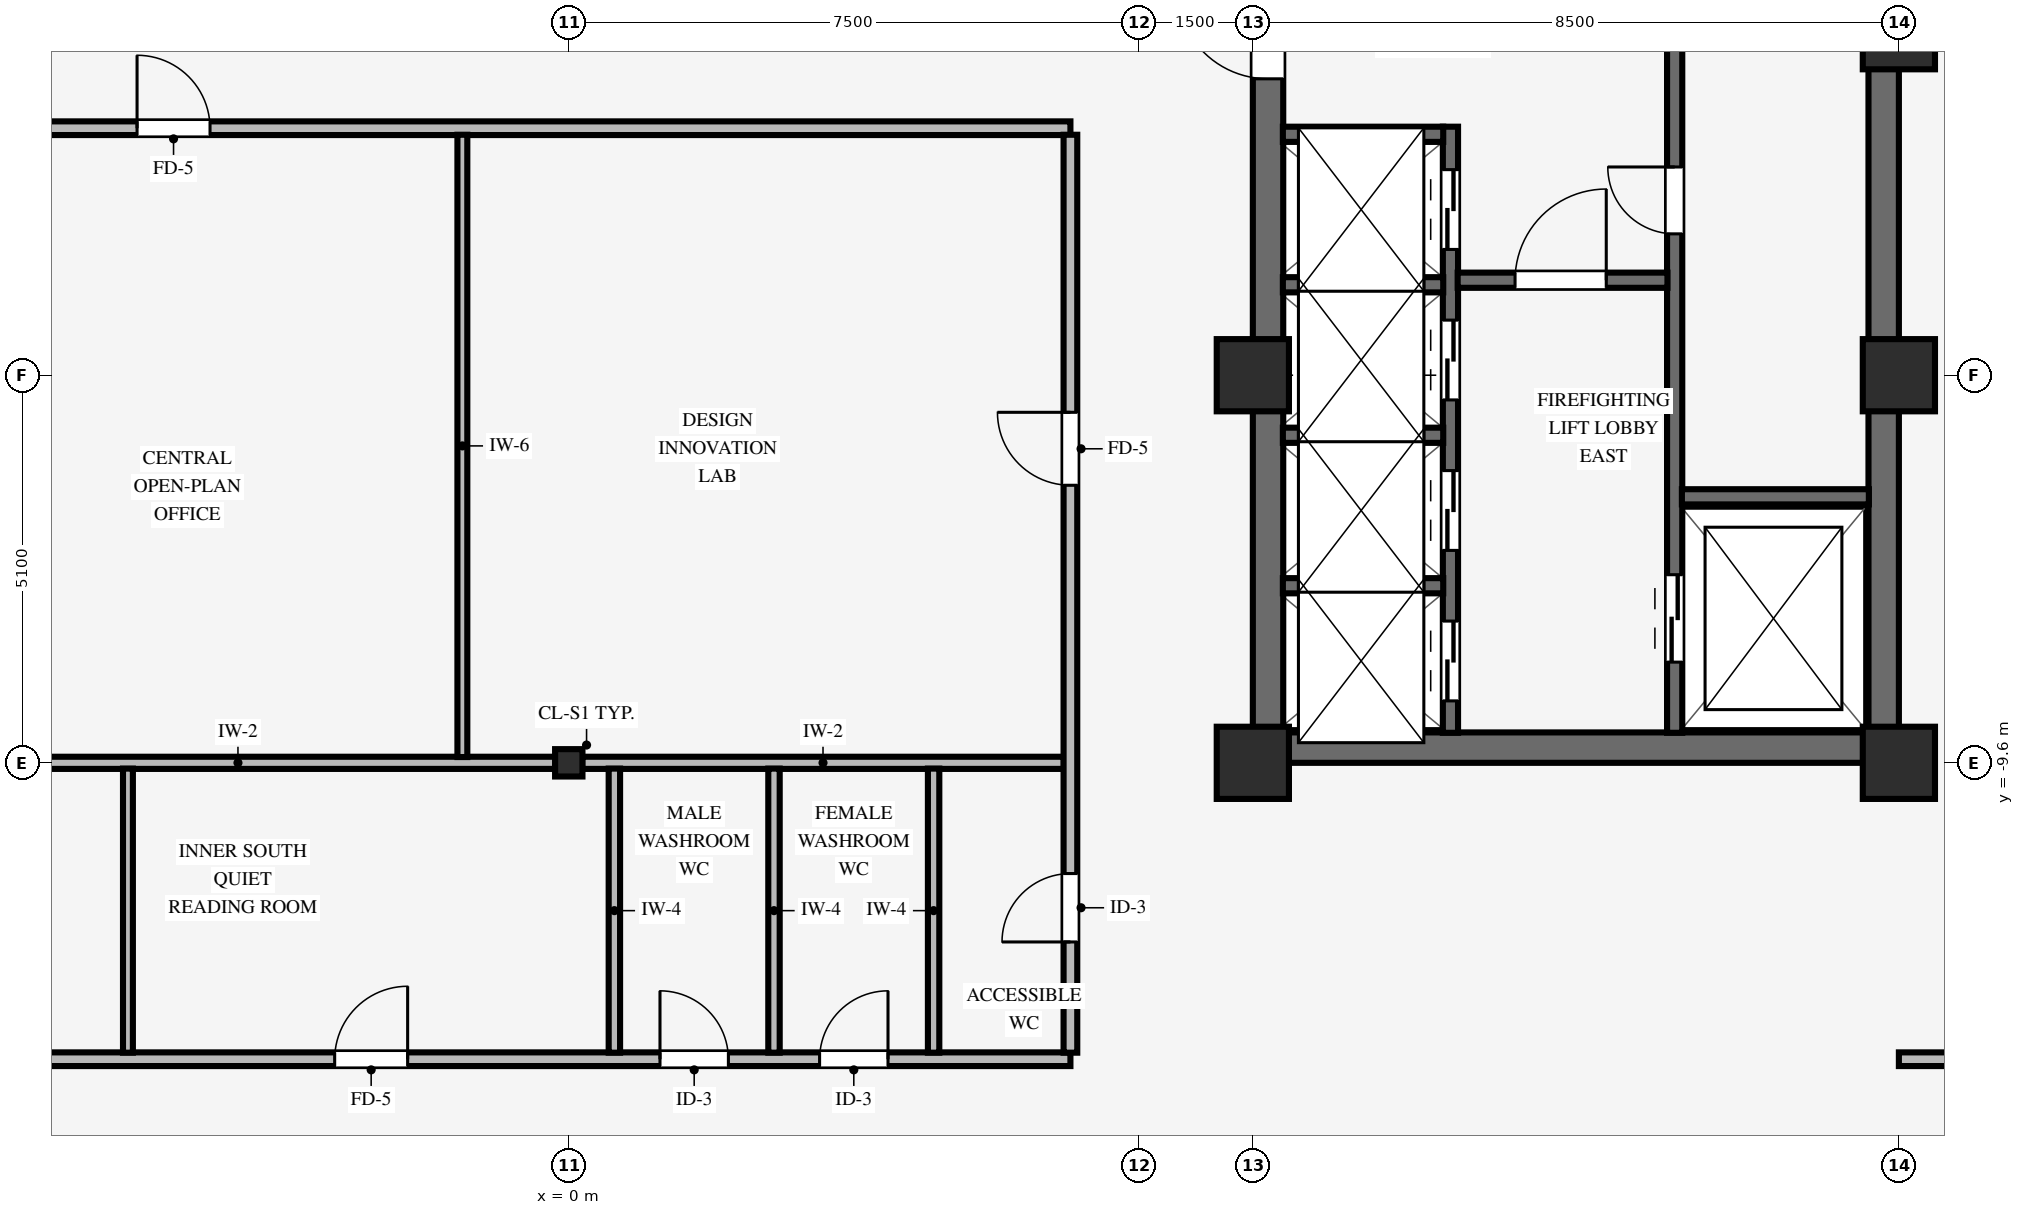
"""IFC4 building model, lengths in metres.
Left out: names, types, materials, properties, quantities, classifications, styles, units other than length and angle.
Written with IfcOpenShell. Run it as: python <this file> out.ifc"""

import sys

from ifc_helpers import new_model, si_unit, direction, frame, frame_2d, origin, origin_2d, place, context, subcontext, project, spatial, rectangle, i_section, extrude, source, transform, mapped, element, fill, save


model = new_model("IFC4")
c1 = context("Model", 3, precision=1e-05, world=origin(), true_north=direction((0.0, 1.0)))
c2 = subcontext(c1, "Body", "Model", "MODEL_VIEW")
j1 = project(units=[si_unit("LENGTHUNIT", "METRE"), si_unit("PLANEANGLEUNIT", "RADIAN")], contexts=[c1])
p1 = place(None, origin())
s1 = spatial("IfcSite", under=j1, at=p1, CompositionType="ELEMENT")
p2 = place(p1, origin())
s2 = spatial("IfcBuilding", under=s1, at=p2, CompositionType="ELEMENT")
p3 = place(p2, frame((0.0, 0.0, 156.7)))
s3 = spatial("IfcBuildingStorey", under=s2, at=p3, CompositionType="ELEMENT", Elevation=156.7)
p4 = place(p3, frame((9.0, -9.4, 0.0), z_axis=(0.0, 0.0, 1.0), x_axis=(1.0, 0.0, 0.0)))
e1 = element("IfcWall", 1, at=p4, inside=s3, PredefinedType="SHEAR", context=c2, shape_type="SweptSolid", body=[
    extrude(rectangle(XDim=8.5, YDim=0.4, at=frame_2d((4.25, 0.0))), origin(), (0.0, 0.0, 1.0), 3.37),
])
p5 = place(p3, frame((9.2, -9.205, 0.0), z_axis=(0.0, 0.0, 1.0), x_axis=(0.0, 1.0, 0.0)))
e2 = element("IfcWall", 2, at=p5, inside=s3, PredefinedType="SHEAR", context=c2, shape_type="SweptSolid", body=[
    extrude(rectangle(XDim=18.41, YDim=0.4, at=frame_2d((9.205, 0.0))), origin(), (0.0, 0.0, 1.0), 3.37),
])
p6 = place(p5, frame((8.605, 0.0, 0.0)))
e3 = element("IfcOpeningElement", 3, at=p6, cuts=e2, PredefinedType="OPENING", context=c2, shape_type="SweptSolid", body=[
    extrude(rectangle(XDim=1.2, YDim=2.15, at=frame_2d((0.6, 1.075))), frame((0.0, 0.21, 0.0), z_axis=(0.0, -1.0, 0.0), x_axis=(1.0, 0.0, 0.0)), (0.0, 0.0, 1.0), 0.42),
])
p7 = place(p3, frame((17.3, -9.205, 0.0), z_axis=(0.0, 0.0, 1.0), x_axis=(0.0, 1.0, 0.0)))
e4 = element("IfcWall", 4, at=p7, inside=s3, PredefinedType="SHEAR", context=c2, shape_type="SweptSolid", body=[
    extrude(rectangle(XDim=18.41, YDim=0.4, at=frame_2d((9.205, 0.0))), origin(), (0.0, 0.0, 1.0), 3.37),
])
for number, where, z_axis, x_axis in (
    (5, (9.0, -9.6, 0.0), (0.0, 0.0, 1.0), (1.0, 0.0, 0.0)),
    (6, (9.0, -4.5, 0.0), (0.0, 0.0, 1.0), (1.0, 0.0, 0.0)),
    (7, (17.5, -9.6, 0.0), (0.0, 0.0, 1.0), (1.0, 0.0, 0.0)),
    (8, (17.5, -4.5, 0.0), (0.0, 0.0, 1.0), (1.0, 0.0, 0.0)),
    (9, (17.5, 0.0, 0.0), (0.0, 0.0, 1.0), (1.0, 0.0, 0.0)),
):
    element("IfcColumn", number, at=place(p3, frame(where, z_axis=z_axis, x_axis=x_axis)), inside=s3, PredefinedType="COLUMN", context=c2, shape_type="SweptSolid", body=[
        extrude(rectangle(XDim=0.95, YDim=0.95, at=origin_2d()), origin(), (0.0, 0.0, 1.0), 3.37),
    ])
p8 = place(p3, frame((0.0, -9.6, 0.0), z_axis=(0.0, 0.0, 1.0), x_axis=(1.0, 0.0, 0.0)))
e10 = element("IfcColumn", 10, at=p8, inside=s3, PredefinedType="COLUMN", context=c2, shape_type="SweptSolid", body=[
    extrude(i_section(OverallWidth=0.36, OverallDepth=0.36, WebThickness=0.021, FlangeThickness=0.021, FilletRadius=0.018, at=origin_2d()), origin(), (0.0, 0.0, 1.0), 3.37),
])
p9 = place(p3, frame((14.55, -9.205, 0.0), z_axis=(0.0, 0.0, 1.0), x_axis=(0.0, 1.0, 0.0)))
e11 = element("IfcWall", 11, at=p9, inside=s3, PredefinedType="SHEAR", context=c2, shape_type="SweptSolid", body=[
    extrude(rectangle(XDim=10.11, YDim=0.2, at=frame_2d((5.055, 0.0))), origin(), (0.0, 0.0, 1.0), 3.37),
])
p10 = place(p9, frame((6.565, 0.0, 0.0)))
e12 = element("IfcOpeningElement", 12, at=p10, cuts=e11, PredefinedType="OPENING", context=c2, shape_type="SweptSolid", body=[
    extrude(rectangle(XDim=0.88, YDim=2.1, at=frame_2d((0.44, 1.05))), frame((0.0, 0.11, 0.0), z_axis=(0.0, -1.0, 0.0), x_axis=(1.0, 0.0, 0.0)), (0.0, 0.0, 1.0), 0.22),
])
p11 = place(p9, frame((0.93, 0.0, 0.0)))
e13 = element("IfcOpeningElement", 13, at=p11, cuts=e11, PredefinedType="OPENING", context=c2, shape_type="SweptSolid", body=[
    extrude(rectangle(XDim=1.15, YDim=2.15, at=frame_2d((0.575, 1.075))), frame((0.0, 0.11, 0.0), z_axis=(0.0, -1.0, 0.0), x_axis=(1.0, 0.0, 0.0)), (0.0, 0.0, 1.0), 0.22),
])
p12 = place(p3, frame((14.645, -6.1, 0.0), z_axis=(0.0, 0.0, 1.0), x_axis=(1.0, 0.0, 0.0)))
e14 = element("IfcWall", 14, at=p12, inside=s3, PredefinedType="SHEAR", context=c2, shape_type="SweptSolid", body=[
    extrude(rectangle(XDim=2.46, YDim=0.2, at=frame_2d((1.23, 0.0))), origin(), (0.0, 0.0, 1.0), 3.37),
])
p13 = place(p3, frame((11.6, -9.205, 0.0), z_axis=(0.0, 0.0, 1.0), x_axis=(0.0, 1.0, 0.0)))
e15 = element("IfcWall", 15, at=p13, inside=s3, PredefinedType="SHEAR", context=c2, shape_type="SweptSolid", body=[
    extrude(rectangle(XDim=7.975, YDim=0.2, at=frame_2d((3.988, 0.0))), origin(), (0.0, 0.0, 1.0), 3.37),
])
p14 = place(p13, frame((0.42, 0.0, 0.0)))
e16 = element("IfcOpeningElement", 16, at=p14, cuts=e15, PredefinedType="OPENING", context=c2, shape_type="SweptSolid", body=[
    extrude(rectangle(XDim=1.05, YDim=2.15, at=frame_2d((0.525, 1.075))), frame((0.0, 0.11, 0.0), z_axis=(0.0, -1.0, 0.0), x_axis=(1.0, 0.0, 0.0)), (0.0, 0.0, 1.0), 0.22),
])
p15 = place(p13, frame((2.4, 0.0, 0.0)))
e17 = element("IfcOpeningElement", 17, at=p15, cuts=e15, PredefinedType="OPENING", context=c2, shape_type="SweptSolid", body=[
    extrude(rectangle(XDim=1.05, YDim=2.15, at=frame_2d((0.525, 1.075))), frame((0.0, 0.11, 0.0), z_axis=(0.0, -1.0, 0.0), x_axis=(1.0, 0.0, 0.0)), (0.0, 0.0, 1.0), 0.22),
])
p16 = place(p13, frame((4.38, 0.0, 0.0)))
e18 = element("IfcOpeningElement", 18, at=p16, cuts=e15, PredefinedType="OPENING", context=c2, shape_type="SweptSolid", body=[
    extrude(rectangle(XDim=1.05, YDim=2.15, at=frame_2d((0.525, 1.075))), frame((0.0, 0.11, 0.0), z_axis=(0.0, -1.0, 0.0), x_axis=(1.0, 0.0, 0.0)), (0.0, 0.0, 1.0), 0.22),
])
p17 = place(p13, frame((6.36, 0.0, 0.0)))
e19 = element("IfcOpeningElement", 19, at=p17, cuts=e15, PredefinedType="OPENING", context=c2, shape_type="SweptSolid", body=[
    extrude(rectangle(XDim=1.05, YDim=2.15, at=frame_2d((0.525, 1.075))), frame((0.0, 0.11, 0.0), z_axis=(0.0, -1.0, 0.0), x_axis=(1.0, 0.0, 0.0)), (0.0, 0.0, 1.0), 0.22),
])
p18 = place(p3, frame((11.695, -3.25, 0.0), z_axis=(0.0, 0.0, 1.0), x_axis=(1.0, 0.0, 0.0)))
e20 = element("IfcWall", 20, at=p18, inside=s3, PredefinedType="SHEAR", context=c2, shape_type="SweptSolid", body=[
    extrude(rectangle(XDim=2.76, YDim=0.2, at=frame_2d((1.38, 0.0))), origin(), (0.0, 0.0, 1.0), 3.37),
])
p19 = place(p18, frame((0.755, 0.0, 0.0)))
e21 = element("IfcOpeningElement", 21, at=p19, cuts=e20, PredefinedType="OPENING", context=c2, shape_type="SweptSolid", body=[
    extrude(rectangle(XDim=1.2, YDim=2.15, at=frame_2d((0.6, 1.075))), frame((0.0, 0.11, 0.0), z_axis=(0.0, -1.0, 0.0), x_axis=(1.0, 0.0, 0.0)), (0.0, 0.0, 1.0), 0.22),
])
for number, where, z_axis, x_axis in (
    (22, (9.395, -7.27, 0.0), (0.0, 0.0, 1.0), (1.0, 0.0, 0.0)),
    (23, (9.395, -5.29, 0.0), (0.0, 0.0, 1.0), (1.0, 0.0, 0.0)),
    (24, (9.395, -3.31, 0.0), (0.0, 0.0, 1.0), (1.0, 0.0, 0.0)),
    (25, (9.395, -1.33, 0.0), (0.0, 0.0, 1.0), (1.0, 0.0, 0.0)),
):
    element("IfcWall", number, at=place(p3, frame(where, z_axis=z_axis, x_axis=x_axis)), inside=s3, PredefinedType="SHEAR", context=c2, shape_type="SweptSolid", body=[
        extrude(rectangle(XDim=2.11, YDim=0.2, at=frame_2d((1.055, 0.0))), origin(), (0.0, 0.0, 1.0), 3.37),
    ])
p20 = place(p3, frame((-17.7, -13.5, 0.0), z_axis=(0.0, 0.0, 1.0), x_axis=(1.0, 0.0, 0.0)))
e26 = element("IfcWall", 26, at=p20, inside=s3, PredefinedType="PARTITIONING", context=c2, shape_type="SweptSolid", body=[
    extrude(rectangle(XDim=24.3, YDim=0.18, at=frame_2d((12.15, 0.0))), origin(), (0.0, 0.0, 1.0), 2.998),
])
p21 = place(p20, frame((5.47, 0.0, 0.0)))
e27 = element("IfcOpeningElement", 27, at=p21, cuts=e26, PredefinedType="OPENING", context=c2, shape_type="SweptSolid", body=[
    extrude(rectangle(XDim=0.96, YDim=2.1, at=frame_2d((0.48, 1.05))), frame((0.0, 0.1, 0.0), z_axis=(0.0, -1.0, 0.0), x_axis=(1.0, 0.0, 0.0)), (0.0, 0.0, 1.0), 0.2),
])
p22 = place(p20, frame((14.62, 0.0, 0.0)))
e28 = element("IfcOpeningElement", 28, at=p22, cuts=e26, PredefinedType="OPENING", context=c2, shape_type="SweptSolid", body=[
    extrude(rectangle(XDim=0.96, YDim=2.1, at=frame_2d((0.48, 1.05))), frame((0.0, 0.1, 0.0), z_axis=(0.0, -1.0, 0.0), x_axis=(1.0, 0.0, 0.0)), (0.0, 0.0, 1.0), 0.2),
])
p23 = place(p20, frame((18.9, 0.0, 0.0)))
e29 = element("IfcOpeningElement", 29, at=p23, cuts=e26, PredefinedType="OPENING", context=c2, shape_type="SweptSolid", body=[
    extrude(rectangle(XDim=0.9, YDim=2.1, at=frame_2d((0.45, 1.05))), frame((0.0, 0.1, 0.0), z_axis=(0.0, -1.0, 0.0), x_axis=(1.0, 0.0, 0.0)), (0.0, 0.0, 1.0), 0.2),
])
p24 = place(p20, frame((21.0, 0.0, 0.0)))
e30 = element("IfcOpeningElement", 30, at=p24, cuts=e26, PredefinedType="OPENING", context=c2, shape_type="SweptSolid", body=[
    extrude(rectangle(XDim=0.9, YDim=2.1, at=frame_2d((0.45, 1.05))), frame((0.0, 0.1, 0.0), z_axis=(0.0, -1.0, 0.0), x_axis=(1.0, 0.0, 0.0)), (0.0, 0.0, 1.0), 0.2),
])
p25 = place(p3, frame((17.5, -13.5, 0.0), z_axis=(0.0, 0.0, 1.0), x_axis=(1.0, 0.0, 0.0)))
e31 = element("IfcWall", 31, at=p25, inside=s3, PredefinedType="PARTITIONING", context=c2, shape_type="SweptSolid", body=[
    extrude(rectangle(XDim=3.3, YDim=0.18, at=frame_2d((1.65, 0.0))), origin(), (0.0, 0.0, 1.0), 2.998),
])
p26 = place(p3, frame((-8.529, -9.6, 0.0), z_axis=(0.0, 0.0, 1.0), x_axis=(1.0, 0.0, 0.0)))
e32 = element("IfcWall", 32, at=p26, inside=s3, PredefinedType="PARTITIONING", context=c2, shape_type="SweptSolid", body=[
    extrude(rectangle(XDim=8.353, YDim=0.16, at=frame_2d((4.177, 0.0))), origin(), (0.0, 0.0, 1.0), 2.405),
])
p27 = place(p3, frame((0.176, -9.6, 0.0), z_axis=(0.0, 0.0, 1.0), x_axis=(1.0, 0.0, 0.0)))
e33 = element("IfcWall", 33, at=p27, inside=s3, PredefinedType="PARTITIONING", context=c2, shape_type="SweptSolid", body=[
    extrude(rectangle(XDim=6.338, YDim=0.16, at=frame_2d((3.169, 0.0))), origin(), (0.0, 0.0, 1.0), 2.405),
])
p28 = place(p3, frame((-9.0, -1.25, 0.0), z_axis=(0.0, 0.0, 1.0), x_axis=(1.0, 0.0, 0.0)))
e34 = element("IfcWall", 34, at=p28, inside=s3, PredefinedType="PARTITIONING", context=c2, shape_type="SweptSolid", body=[
    extrude(rectangle(XDim=15.6, YDim=0.18, at=frame_2d((7.8, 0.0))), origin(), (0.0, 0.0, 1.0), 3.36),
])
p29 = place(p28, frame((3.32, 0.0, 0.0)))
e35 = element("IfcOpeningElement", 35, at=p29, cuts=e34, PredefinedType="OPENING", context=c2, shape_type="SweptSolid", body=[
    extrude(rectangle(XDim=0.96, YDim=2.1, at=frame_2d((0.48, 1.05))), frame((0.0, 0.1, 0.0), z_axis=(0.0, -1.0, 0.0), x_axis=(1.0, 0.0, 0.0)), (0.0, 0.0, 1.0), 0.2),
])
p30 = place(p3, frame((-5.8, -13.414, 0.0), z_axis=(0.0, 0.0, 1.0), x_axis=(0.0, 1.0, 0.0)))
e36 = element("IfcWall", 36, at=p30, inside=s3, PredefinedType="PARTITIONING", context=c2, shape_type="SweptSolid", body=[
    extrude(rectangle(XDim=3.738, YDim=0.13, at=frame_2d((1.869, 0.0))), origin(), (0.0, 0.0, 1.0), 3.36),
])
p31 = place(p3, frame((-1.4, -9.524, 0.0), z_axis=(0.0, 0.0, 1.0), x_axis=(0.0, 1.0, 0.0)))
e37 = element("IfcWall", 37, at=p31, inside=s3, PredefinedType="PARTITIONING", context=c2, shape_type="SweptSolid", body=[
    extrude(rectangle(XDim=8.188, YDim=0.13, at=frame_2d((4.094, 0.0))), origin(), (0.0, 0.0, 1.0), 3.36),
])
for number, where, z_axis, x_axis in (
    (38, (0.6, -13.414, 0.0), (0.0, 0.0, 1.0), (0.0, 1.0, 0.0)),
    (39, (2.7, -13.414, 0.0), (0.0, 0.0, 1.0), (0.0, 1.0, 0.0)),
    (40, (4.8, -13.414, 0.0), (0.0, 0.0, 1.0), (0.0, 1.0, 0.0)),
):
    element("IfcWall", number, at=place(p3, frame(where, z_axis=z_axis, x_axis=x_axis)), inside=s3, PredefinedType="PARTITIONING", context=c2, shape_type="SweptSolid", body=[
        extrude(rectangle(XDim=3.738, YDim=0.15, at=frame_2d((1.869, 0.0))), origin(), (0.0, 0.0, 1.0), 3.36),
    ])
p32 = place(p3, frame((6.6, -13.414, 0.0), z_axis=(0.0, 0.0, 1.0), x_axis=(0.0, 1.0, 0.0)))
e41 = element("IfcWall", 41, at=p32, inside=s3, PredefinedType="PARTITIONING", context=c2, shape_type="SweptSolid", body=[
    extrude(rectangle(XDim=12.078, YDim=0.18, at=frame_2d((6.039, 0.0))), origin(), (0.0, 0.0, 1.0), 3.36),
])
p33 = place(p32, frame((7.466, 0.0, 0.0)))
e42 = element("IfcOpeningElement", 42, at=p33, cuts=e41, PredefinedType="OPENING", context=c2, shape_type="SweptSolid", body=[
    extrude(rectangle(XDim=0.96, YDim=2.1, at=frame_2d((0.48, 1.05))), frame((0.0, 0.1, 0.0), z_axis=(0.0, -1.0, 0.0), x_axis=(1.0, 0.0, 0.0)), (0.0, 0.0, 1.0), 0.2),
])
p34 = place(p32, frame((1.457, 0.0, 0.0)))
e43 = element("IfcOpeningElement", 43, at=p34, cuts=e41, PredefinedType="OPENING", context=c2, shape_type="SweptSolid", body=[
    extrude(rectangle(XDim=0.9, YDim=2.1, at=frame_2d((0.45, 1.05))), frame((0.0, 0.1, 0.0), z_axis=(0.0, -1.0, 0.0), x_axis=(1.0, 0.0, 0.0)), (0.0, 0.0, 1.0), 0.2),
])
m1 = source(origin(), c2, "Body", "SweptSolid", [
    extrude(rectangle(XDim=0.88, YDim=2.1, at=frame_2d((0.44, 1.05))), frame((0.0, 0.025, 0.0), z_axis=(0.0, -1.0, 0.0), x_axis=(1.0, 0.0, 0.0)), (0.0, 0.0, 1.0), 0.05),
])
p35 = place(p10, origin())
e44 = element("IfcDoor", 44, at=p35, inside=s3, OperationType="SINGLE_SWING_RIGHT", PredefinedType="DOOR", context=c2, shape_type="MappedRepresentation", body=[
    mapped(m1, transform((0.0, 0.0, 0.0), scale=1.0)),
])
fill(e12, e44)
m2 = source(origin(), c2, "Body", "SweptSolid", [
    extrude(rectangle(XDim=1.2, YDim=2.15, at=frame_2d((0.6, 1.075))), frame((0.0, 0.025, 0.0), z_axis=(0.0, -1.0, 0.0), x_axis=(1.0, 0.0, 0.0)), (0.0, 0.0, 1.0), 0.05),
])
p36 = place(p19, origin())
e45 = element("IfcDoor", 45, at=p36, inside=s3, OperationType="SINGLE_SWING_RIGHT", PredefinedType="DOOR", context=c2, shape_type="MappedRepresentation", body=[
    mapped(m2, transform((0.0, 0.0, 0.0), scale=1.0)),
])
fill(e21, e45)
p37 = place(p6, origin())
e46 = element("IfcDoor", 46, at=p37, inside=s3, OperationType="SINGLE_SWING_RIGHT", PredefinedType="DOOR", context=c2, shape_type="MappedRepresentation", body=[
    mapped(m2, transform((0.0, 0.0, 0.0), scale=1.0)),
])
fill(e3, e46)
m3 = source(origin(), c2, "Body", "SweptSolid", [
    extrude(rectangle(XDim=1.15, YDim=2.15, at=frame_2d((0.575, 1.075))), frame((0.0, 0.025, 0.0), z_axis=(0.0, -1.0, 0.0), x_axis=(1.0, 0.0, 0.0)), (0.0, 0.0, 1.0), 0.05),
])
p38 = place(p11, origin())
e47 = element("IfcDoor", 47, at=p38, inside=s3, OperationType="DOUBLE_DOOR_SLIDING", PredefinedType="DOOR", context=c2, shape_type="MappedRepresentation", body=[
    mapped(m3, transform((0.0, 0.0, 0.0), scale=1.0)),
])
fill(e13, e47)
m4 = source(origin(), c2, "Body", "SweptSolid", [
    extrude(rectangle(XDim=1.05, YDim=2.15, at=frame_2d((0.525, 1.075))), frame((0.0, 0.025, 0.0), z_axis=(0.0, -1.0, 0.0), x_axis=(1.0, 0.0, 0.0)), (0.0, 0.0, 1.0), 0.05),
])
p39 = place(p14, origin())
e48 = element("IfcDoor", 48, at=p39, inside=s3, OperationType="DOUBLE_DOOR_SLIDING", PredefinedType="DOOR", context=c2, shape_type="MappedRepresentation", body=[
    mapped(m4, transform((0.0, 0.0, 0.0), scale=1.0)),
])
fill(e16, e48)
p40 = place(p15, origin())
e49 = element("IfcDoor", 49, at=p40, inside=s3, OperationType="DOUBLE_DOOR_SLIDING", PredefinedType="DOOR", context=c2, shape_type="MappedRepresentation", body=[
    mapped(m4, transform((0.0, 0.0, 0.0), scale=1.0)),
])
fill(e17, e49)
p41 = place(p16, origin())
e50 = element("IfcDoor", 50, at=p41, inside=s3, OperationType="DOUBLE_DOOR_SLIDING", PredefinedType="DOOR", context=c2, shape_type="MappedRepresentation", body=[
    mapped(m4, transform((0.0, 0.0, 0.0), scale=1.0)),
])
fill(e18, e50)
p42 = place(p17, origin())
e51 = element("IfcDoor", 51, at=p42, inside=s3, OperationType="DOUBLE_DOOR_SLIDING", PredefinedType="DOOR", context=c2, shape_type="MappedRepresentation", body=[
    mapped(m4, transform((0.0, 0.0, 0.0), scale=1.0)),
])
fill(e19, e51)
m5 = source(origin(), c2, "Body", "SweptSolid", [
    extrude(rectangle(XDim=0.96, YDim=2.1, at=frame_2d((0.48, 1.05))), frame((0.0, 0.025, 0.0), z_axis=(0.0, -1.0, 0.0), x_axis=(1.0, 0.0, 0.0)), (0.0, 0.0, 1.0), 0.05),
])
p43 = place(p33, origin())
e52 = element("IfcDoor", 52, at=p43, inside=s3, OperationType="SINGLE_SWING_RIGHT", PredefinedType="DOOR", context=c2, shape_type="MappedRepresentation", body=[
    mapped(m5, transform((0.0, 0.0, 0.0), scale=1.0)),
])
fill(e42, e52)
p44 = place(p29, origin())
e53 = element("IfcDoor", 53, at=p44, inside=s3, OperationType="SINGLE_SWING_LEFT", PredefinedType="DOOR", context=c2, shape_type="MappedRepresentation", body=[
    mapped(m5, transform((0.0, 0.0, 0.0), scale=1.0)),
])
fill(e35, e53)
p45 = place(p22, origin())
e54 = element("IfcDoor", 54, at=p45, inside=s3, OperationType="SINGLE_SWING_RIGHT", PredefinedType="DOOR", context=c2, shape_type="MappedRepresentation", body=[
    mapped(m5, transform((0.0, 0.0, 0.0), scale=1.0)),
])
fill(e28, e54)
m6 = source(origin(), c2, "Body", "SweptSolid", [
    extrude(rectangle(XDim=0.9, YDim=2.1, at=frame_2d((0.45, 1.05))), frame((0.0, 0.025, 0.0), z_axis=(0.0, -1.0, 0.0), x_axis=(1.0, 0.0, 0.0)), (0.0, 0.0, 1.0), 0.05),
])
p46 = place(p34, origin())
e55 = element("IfcDoor", 55, at=p46, inside=s3, OperationType="SINGLE_SWING_LEFT", PredefinedType="DOOR", context=c2, shape_type="MappedRepresentation", body=[
    mapped(m6, transform((0.0, 0.0, 0.0), scale=1.0)),
])
fill(e43, e55)
p47 = place(p23, origin())
e56 = element("IfcDoor", 56, at=p47, inside=s3, OperationType="SINGLE_SWING_LEFT", PredefinedType="DOOR", context=c2, shape_type="MappedRepresentation", body=[
    mapped(m6, transform((0.0, 0.0, 0.0), scale=1.0)),
])
fill(e29, e56)
p48 = place(p24, origin())
e57 = element("IfcDoor", 57, at=p48, inside=s3, OperationType="SINGLE_SWING_RIGHT", PredefinedType="DOOR", context=c2, shape_type="MappedRepresentation", body=[
    mapped(m6, transform((0.0, 0.0, 0.0), scale=1.0)),
])
fill(e30, e57)
save(model, sys.argv[1])
